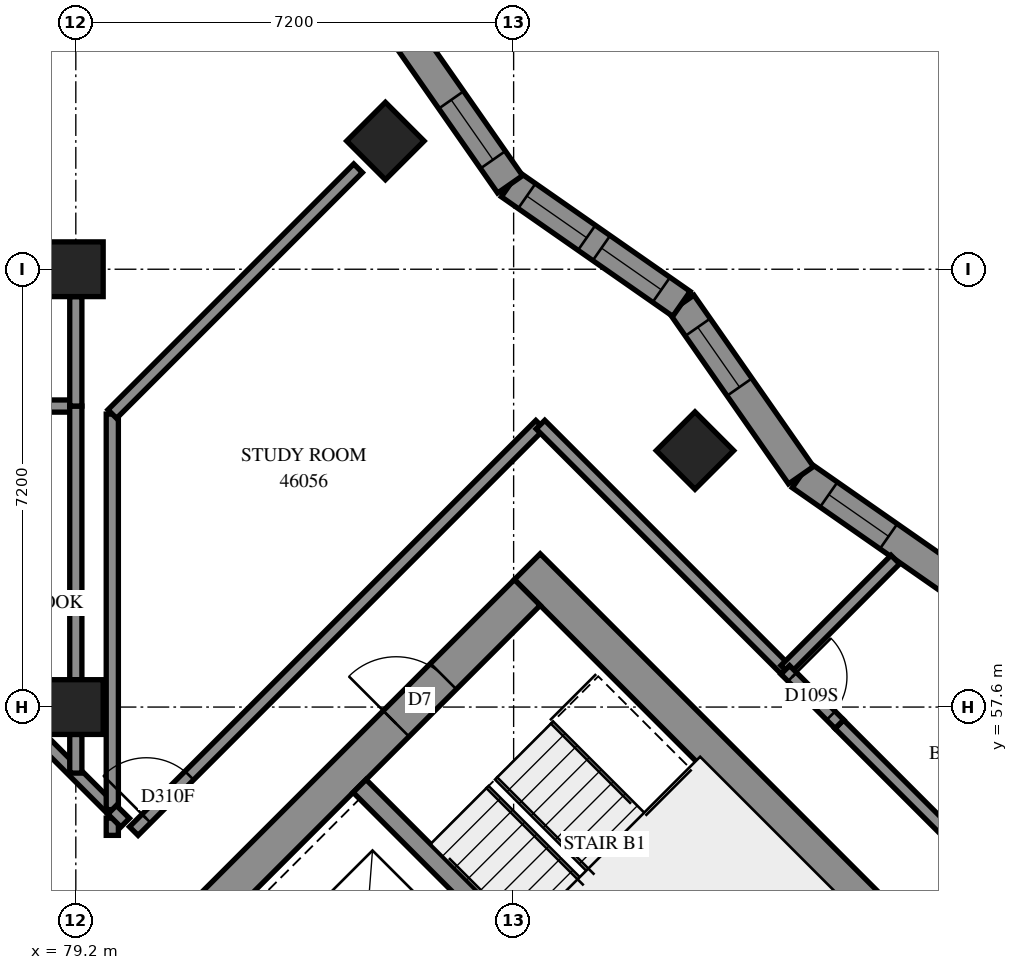
"""IFC4 building model, lengths in metres.
Left out: names, types, materials, properties, quantities, classifications, styles, units other than length and angle.
Written with IfcOpenShell. Run it as: python <this file> out.ifc"""

import sys

from ifc_helpers import new_model, si_unit, direction, frame, frame_2d, origin, origin_2d, place, context, subcontext, project, spatial, polyline, rectangle, outline, extrude, element, fill, save


model = new_model("IFC4")
c1 = context("Model", 3, precision=1e-05, world=origin(), true_north=direction((0.0, 1.0)))
c2 = subcontext(c1, "Body", "Model", "MODEL_VIEW")
j1 = project(units=[si_unit("LENGTHUNIT", "METRE"), si_unit("PLANEANGLEUNIT", "RADIAN")], contexts=[c1])
p1 = place(None, origin())
s1 = spatial("IfcSite", under=j1, at=p1, CompositionType="ELEMENT")
p2 = place(p1, origin())
s2 = spatial("IfcBuilding", under=s1, at=p2, CompositionType="ELEMENT")
p3 = place(p2, frame((0.0, 0.0, 169.4)))
s3 = spatial("IfcBuildingStorey", under=s2, at=p3, CompositionType="ELEMENT", Elevation=169.4)
for number, where, z_axis, x_axis in (
    (1, (79.2, 57.6, 0.0), (0.0, 0.0, 1.0), (1.0, 0.0, 0.0)),
    (2, (79.2, 64.8, 0.0), (0.0, 0.0, 1.0), (1.0, 0.0, 0.0)),
    (3, (84.291, 66.909, 0.0), (0.0, 0.0, 1.0), (0.707, -0.707, 0.0)),
    (4, (89.382, 61.818, 0.0), (0.0, 0.0, 1.0), (0.707, -0.707, 0.0)),
):
    element("IfcColumn", number, at=place(p3, frame(where, z_axis=z_axis, x_axis=x_axis)), inside=s3, PredefinedType="COLUMN", context=c2, shape_type="SweptSolid", body=[
        extrude(rectangle(XDim=0.9, YDim=0.9, at=origin_2d()), origin(), (0.0, 0.0, 1.0), 3.1),
    ])
p4 = place(p3, frame((86.625, 59.908, -0.3), z_axis=(0.0, 0.0, 1.0), x_axis=(0.7071067812, -0.7071067812, 0.0)))
e5 = element("IfcWall", 5, at=p4, inside=s3, PredefinedType="SHEAR", context=c2, shape_type="SweptSolid", body=[
    extrude(rectangle(XDim=15.6, YDim=0.6, at=frame_2d((7.8, 0.0))), origin(), (0.0, 0.0, 1.0), 2.7),
])
p5 = place(p4, frame((10.6, 0.0, 0.3)))
e6 = element("IfcOpeningElement", 6, at=p5, cuts=e5, PredefinedType="OPENING", context=c2, shape_type="SweptSolid", body=[
    extrude(rectangle(XDim=0.8, YDim=2.1, at=frame_2d((0.4, 1.05))), frame((0.0, 0.31, 0.0), z_axis=(0.0, -1.0, 0.0), x_axis=(1.0, 0.0, 0.0)), (0.0, 0.0, 1.0), 0.62),
])
p6 = place(p3, frame((76.442, 49.302, -0.3), z_axis=(0.0, 0.0, 1.0), x_axis=(0.7071067812, 0.7071067812, 0.0)))
e7 = element("IfcWall", 7, at=p6, inside=s3, PredefinedType="SHEAR", context=c2, shape_type="SweptSolid", body=[
    extrude(rectangle(XDim=14.4, YDim=0.6, at=frame_2d((7.2, 0.0))), origin(), (0.0, 0.0, 1.0), 2.7),
])
p7 = place(p6, frame((4.55, 0.0, 0.3)))
e8 = element("IfcOpeningElement", 8, at=p7, cuts=e7, PredefinedType="OPENING", context=c2, shape_type="SweptSolid", body=[
    extrude(rectangle(XDim=1.1, YDim=2.1, at=frame_2d((0.55, 1.05))), frame((0.0, 0.31, 0.0), z_axis=(0.0, -1.0, 0.0), x_axis=(1.0, 0.0, 0.0)), (0.0, 0.0, 1.0), 0.62),
])
p8 = place(p6, frame((11.35, 0.0, 0.3)))
e9 = element("IfcOpeningElement", 9, at=p8, cuts=e7, PredefinedType="OPENING", context=c2, shape_type="SweptSolid", body=[
    extrude(rectangle(XDim=1.1, YDim=2.1, at=frame_2d((0.55, 1.05))), frame((0.0, 0.31, 0.0), z_axis=(0.0, -1.0, 0.0), x_axis=(1.0, 0.0, 0.0)), (0.0, 0.0, 1.0), 0.62),
])
p9 = place(p3, frame((83.867, 56.302, 0.0), z_axis=(0.0, 0.0, 1.0), x_axis=(0.7071137256, -0.7070998367, 0.0)))
e10 = element("IfcWall", 10, at=p9, inside=s3, PredefinedType="SOLIDWALL", context=c2, shape_type="SweptSolid", body=[
    extrude(rectangle(XDim=7.2, YDim=0.3, at=frame_2d((3.6, 0.0))), origin(), (0.0, 0.0, 1.0), 3.1),
])
p10 = place(p3, frame((93.944, 59.447, 0.0), z_axis=(0.0, 0.0, 1.0), x_axis=(-0.8202082464, 0.5720650597, 0.0)))
e11 = element("IfcWall", 11, at=p10, inside=s3, PredefinedType="SOLIDWALL", context=c2, shape_type="SweptSolid", body=[
    extrude(outline(polyline([(-0.045, -0.25), (3.392, -0.25), (3.481, 0.25), (0.045, 0.25), (-0.045, -0.25)])), origin(), (0.0, 0.0, 1.0), 3.1),
])
p11 = place(p10, frame((1.68, 0.0, 0.45)))
e12 = element("IfcOpeningElement", 12, at=p11, cuts=e11, PredefinedType="OPENING", context=c2, shape_type="SweptSolid", body=[
    extrude(rectangle(XDim=1.2, YDim=2.5, at=frame_2d((0.6, 1.25))), frame((0.0, 0.26, 0.0), z_axis=(0.0, -1.0, 0.0), x_axis=(1.0, 0.0, 0.0)), (0.0, 0.0, 1.0), 0.52),
])
p12 = place(p3, frame((91.126, 61.412, 0.0), z_axis=(0.0, 0.0, 1.0), x_axis=(-0.5720454818, 0.8202219009, 0.0)))
e13 = element("IfcWall", 13, at=p12, inside=s3, PredefinedType="SOLIDWALL", context=c2, shape_type="SweptSolid", body=[
    extrude(outline(polyline([(0.045, -0.25), (3.481, -0.25), (3.392, 0.25), (-0.045, 0.25), (0.045, -0.25)])), origin(), (0.0, 0.0, 1.0), 3.1),
])
p13 = place(p12, frame((1.768, 0.0, 0.45)))
e14 = element("IfcOpeningElement", 14, at=p13, cuts=e13, PredefinedType="OPENING", context=c2, shape_type="SweptSolid", body=[
    extrude(rectangle(XDim=1.2, YDim=2.5, at=frame_2d((0.6, 1.25))), frame((0.0, 0.26, 0.0), z_axis=(0.0, -1.0, 0.0), x_axis=(1.0, 0.0, 0.0)), (0.0, 0.0, 1.0), 0.52),
])
p14 = place(p3, frame((89.16, 64.231, 0.0), z_axis=(0.0, 0.0, 1.0), x_axis=(-0.8202219009, 0.5720454818, 0.0)))
e15 = element("IfcWall", 15, at=p14, inside=s3, PredefinedType="SOLIDWALL", context=c2, shape_type="SweptSolid", body=[
    extrude(outline(polyline([(-0.045, -0.25), (3.392, -0.25), (3.481, 0.25), (0.045, 0.25), (-0.045, -0.25)])), origin(), (0.0, 0.0, 1.0), 3.1),
])
p15 = place(p14, frame((0.404, 0.0, 0.45)))
e16 = element("IfcOpeningElement", 16, at=p15, cuts=e15, PredefinedType="OPENING", context=c2, shape_type="SweptSolid", body=[
    extrude(rectangle(XDim=1.2, YDim=2.5, at=frame_2d((0.6, 1.25))), frame((0.0, 0.26, 0.0), z_axis=(0.0, -1.0, 0.0), x_axis=(1.0, 0.0, 0.0)), (0.0, 0.0, 1.0), 0.52),
])
p16 = place(p14, frame((1.9, 0.0, 0.45)))
e17 = element("IfcOpeningElement", 17, at=p16, cuts=e15, PredefinedType="OPENING", context=c2, shape_type="SweptSolid", body=[
    extrude(rectangle(XDim=1.2, YDim=2.5, at=frame_2d((0.6, 1.25))), frame((0.0, 0.26, 0.0), z_axis=(0.0, -1.0, 0.0), x_axis=(1.0, 0.0, 0.0)), (0.0, 0.0, 1.0), 0.52),
])
p17 = place(p3, frame((86.341, 66.197, 0.0), z_axis=(0.0, 0.0, 1.0), x_axis=(-0.5720454818, 0.8202219009, 0.0)))
e18 = element("IfcWall", 18, at=p17, inside=s3, PredefinedType="SOLIDWALL", context=c2, shape_type="SweptSolid", body=[
    extrude(outline(polyline([(0.045, -0.25), (3.481, -0.25), (3.392, 0.25), (-0.045, 0.25), (0.045, -0.25)])), origin(), (0.0, 0.0, 1.0), 3.1),
])
p18 = place(p17, frame((0.492, 0.0, 0.45)))
e19 = element("IfcOpeningElement", 19, at=p18, cuts=e18, PredefinedType="OPENING", context=c2, shape_type="SweptSolid", body=[
    extrude(rectangle(XDim=1.2, YDim=2.5, at=frame_2d((0.6, 1.25))), frame((0.0, 0.26, 0.0), z_axis=(0.0, -1.0, 0.0), x_axis=(1.0, 0.0, 0.0)), (0.0, 0.0, 1.0), 0.52),
])
p19 = place(p3, frame((91.755, 57.317, 0.0), z_axis=(0.0, 0.0, 1.0), x_axis=(0.7071067812, -0.7071067812, 0.0)))
e20 = element("IfcWall", 20, at=p19, inside=s3, PredefinedType="PARTITIONING", context=c2, shape_type="SweptSolid", body=[
    extrude(rectangle(XDim=11.639, YDim=0.2, at=frame_2d((5.819, 0.0))), origin(), (0.0, 0.0, 1.0), 3.1),
])
p20 = place(p3, frame((80.154, 55.56, 0.0), z_axis=(0.0, 0.0, 1.0), x_axis=(0.7071067812, 0.7071067812, 0.0)))
e21 = element("IfcWall", 21, at=p20, inside=s3, PredefinedType="PARTITIONING", context=c2, shape_type="SweptSolid", body=[
    extrude(rectangle(XDim=9.45, YDim=0.2, at=frame_2d((4.725, 0.0))), origin(), (0.0, 0.0, 1.0), 3.1),
])
p21 = place(p20, frame((0.292, 0.0, 0.0)))
e22 = element("IfcOpeningElement", 22, at=p21, cuts=e21, PredefinedType="OPENING", context=c2, shape_type="SweptSolid", body=[
    extrude(rectangle(XDim=1.0, YDim=2.1, at=frame_2d((0.5, 1.05))), frame((0.0, 0.11, 0.0), z_axis=(0.0, -1.0, 0.0), x_axis=(1.0, 0.0, 0.0)), (0.0, 0.0, 1.0), 0.22),
])
p22 = place(p3, frame((74.097, 61.611, 0.0), z_axis=(0.0, 0.0, 1.0), x_axis=(0.7071067812, -0.7071067812, 0.0)))
e23 = element("IfcWall", 23, at=p22, inside=s3, PredefinedType="PARTITIONING", context=c2, shape_type="SweptSolid", body=[
    extrude(rectangle(XDim=8.061, YDim=0.2, at=frame_2d((4.03, 0.0))), origin(), (0.0, 0.0, 1.0), 3.1),
])
p23 = place(p3, frame((79.8, 55.914, 0.0), z_axis=(0.0, 0.0, 1.0), x_axis=(0.0, 1.0, 0.0)))
e24 = element("IfcWall", 24, at=p23, inside=s3, PredefinedType="PARTITIONING", context=c2, shape_type="SweptSolid", body=[
    extrude(rectangle(XDim=6.504, YDim=0.2, at=frame_2d((3.252, 0.0))), origin(), (0.0, 0.0, 1.0), 3.1),
])
p24 = place(p3, frame((79.799, 62.419, 0.0), z_axis=(0.0, 0.0, 1.0), x_axis=(0.7071067812, 0.7071067812, 0.0)))
e25 = element("IfcWall", 25, at=p24, inside=s3, PredefinedType="PARTITIONING", context=c2, shape_type="SweptSolid", body=[
    extrude(rectangle(XDim=5.716, YDim=0.2, at=frame_2d((2.858, 0.0))), origin(), (0.0, 0.0, 1.0), 3.1),
])
p25 = place(p3, frame((86.841, 62.245, 0.0), z_axis=(0.0, 0.0, 1.0), x_axis=(0.7071067812, -0.7071067812, 0.0)))
e26 = element("IfcWall", 26, at=p25, inside=s3, PredefinedType="PARTITIONING", context=c2, shape_type="SweptSolid", body=[
    extrude(rectangle(XDim=5.699, YDim=0.2, at=frame_2d((2.85, 0.0))), origin(), (0.0, 0.0, 1.0), 3.1),
])
p26 = place(p3, frame((74.102, 62.55, 0.0), z_axis=(0.0, 0.0, 1.0), x_axis=(1.0, 0.0, 0.0)))
e27 = element("IfcWall", 27, at=p26, inside=s3, PredefinedType="PARTITIONING", context=c2, shape_type="SweptSolid", body=[
    extrude(rectangle(XDim=5.098, YDim=0.2, at=frame_2d((2.549, 0.0))), origin(), (0.0, 0.0, 1.0), 3.1),
])
p27 = place(p26, frame((1.319, 0.0, 0.0)))
e28 = element("IfcOpeningElement", 28, at=p27, cuts=e27, PredefinedType="OPENING", context=c2, shape_type="SweptSolid", body=[
    extrude(rectangle(XDim=1.0, YDim=2.1, at=frame_2d((0.5, 1.05))), frame((0.0, 0.11, 0.0), z_axis=(0.0, -1.0, 0.0), x_axis=(1.0, 0.0, 0.0)), (0.0, 0.0, 1.0), 0.22),
])
p28 = place(p3, frame((79.2, 58.05, 0.0), z_axis=(0.0, 0.0, 1.0), x_axis=(0.0, 1.0, 0.0)))
e29 = element("IfcWall", 29, at=p28, inside=s3, PredefinedType="PARTITIONING", context=c2, shape_type="SweptSolid", body=[
    extrude(rectangle(XDim=4.5, YDim=0.2, at=frame_2d((2.25, 0.0))), origin(), (0.0, 0.0, 1.0), 3.1),
])
p29 = place(p3, frame((90.867, 58.213, 0.0), z_axis=(0.0, 0.0, 1.0), x_axis=(0.7066186165, 0.7075946091, 0.0)))
e30 = element("IfcWall", 30, at=p29, inside=s3, PredefinedType="PARTITIONING", context=c2, shape_type="SweptSolid", body=[
    extrude(rectangle(XDim=2.562, YDim=0.2, at=frame_2d((1.281, 0.0))), origin(), (0.0, 0.0, 1.0), 3.1),
])
p30 = place(p3, frame((79.2, 62.55, 0.0), z_axis=(0.0, 0.0, 1.0), x_axis=(0.0, 1.0, 0.0)))
e31 = element("IfcWall", 31, at=p30, inside=s3, PredefinedType="PARTITIONING", context=c2, shape_type="SweptSolid", body=[
    extrude(rectangle(XDim=1.8, YDim=0.2, at=frame_2d((0.9, 0.0))), origin(), (0.0, 0.0, 1.0), 3.1),
])
p31 = place(p3, frame((90.867, 58.211, 0.0), z_axis=(0.0, 0.0, 1.0), x_axis=(0.706312726, -0.7078999456, 0.0)))
e32 = element("IfcWall", 32, at=p31, inside=s3, PredefinedType="PARTITIONING", context=c2, shape_type="SweptSolid", body=[
    extrude(rectangle(XDim=1.26, YDim=0.2, at=frame_2d((0.63, 0.0))), origin(), (0.0, 0.0, 1.0), 3.1),
])
p32 = place(p31, frame((0.162, 0.0, 0.0)))
e33 = element("IfcOpeningElement", 33, at=p32, cuts=e32, PredefinedType="OPENING", context=c2, shape_type="SweptSolid", body=[
    extrude(rectangle(XDim=0.9, YDim=2.1, at=frame_2d((0.45, 1.05))), frame((0.0, 0.11, 0.0), z_axis=(0.0, -1.0, 0.0), x_axis=(1.0, 0.0, 0.0)), (0.0, 0.0, 1.0), 0.22),
])
p33 = place(p3, frame((79.2, 56.514, 0.0), z_axis=(0.0, 0.0, 1.0), x_axis=(0.0, 1.0, 0.0)))
e34 = element("IfcWall", 34, at=p33, inside=s3, PredefinedType="PARTITIONING", context=c2, shape_type="SweptSolid", body=[
    extrude(rectangle(XDim=0.636, YDim=0.2, at=frame_2d((0.318, 0.0))), origin(), (0.0, 0.0, 1.0), 3.1),
])
p34 = place(p3, frame((79.8, 55.49, 0.0), z_axis=(0.0, 0.0, 1.0), x_axis=(0.0, 1.0, 0.0)))
e35 = element("IfcWall", 35, at=p34, inside=s3, PredefinedType="PARTITIONING", context=c2, shape_type="SweptSolid", body=[
    extrude(rectangle(XDim=0.284, YDim=0.2, at=frame_2d((0.142, 0.0))), origin(), (0.0, 0.0, 1.0), 3.1),
])
p35 = place(p3, frame((79.797, 55.911, 0.0), z_axis=(0.0, 0.0, 1.0), x_axis=(0.710418702, -0.7037792749, 0.0)))
e36 = element("IfcWall", 36, at=p35, inside=s3, PredefinedType="PARTITIONING", context=c2, shape_type="SweptSolid", body=[
    extrude(rectangle(XDim=0.301, YDim=0.2, at=frame_2d((0.151, 0.0))), origin(), (0.0, 0.0, 1.0), 3.1),
])
p36 = place(p11, origin())
e37 = element("IfcWindow", 37, at=p36, inside=s3, PartitioningType="SINGLE_PANEL", PredefinedType="WINDOW", context=c2, shape_type="SweptSolid", body=[
    extrude(rectangle(XDim=1.2, YDim=2.5, at=frame_2d((0.6, 1.25))), frame((0.0, 0.18, 0.0), z_axis=(0.0, -1.0, 0.0), x_axis=(1.0, 0.0, 0.0)), (0.0, 0.0, 1.0), 0.06),
])
fill(e12, e37)
p37 = place(p13, origin())
e38 = element("IfcWindow", 38, at=p37, inside=s3, PartitioningType="SINGLE_PANEL", PredefinedType="WINDOW", context=c2, shape_type="SweptSolid", body=[
    extrude(rectangle(XDim=1.2, YDim=2.5, at=frame_2d((0.6, 1.25))), frame((0.0, 0.18, 0.0), z_axis=(0.0, -1.0, 0.0), x_axis=(1.0, 0.0, 0.0)), (0.0, 0.0, 1.0), 0.06),
])
fill(e14, e38)
p38 = place(p15, origin())
e39 = element("IfcWindow", 39, at=p38, inside=s3, PartitioningType="SINGLE_PANEL", PredefinedType="WINDOW", context=c2, shape_type="SweptSolid", body=[
    extrude(rectangle(XDim=1.2, YDim=2.5, at=frame_2d((0.6, 1.25))), frame((0.0, 0.18, 0.0), z_axis=(0.0, -1.0, 0.0), x_axis=(1.0, 0.0, 0.0)), (0.0, 0.0, 1.0), 0.06),
])
fill(e16, e39)
p39 = place(p16, origin())
e40 = element("IfcWindow", 40, at=p39, inside=s3, PartitioningType="SINGLE_PANEL", PredefinedType="WINDOW", context=c2, shape_type="SweptSolid", body=[
    extrude(rectangle(XDim=1.2, YDim=2.5, at=frame_2d((0.6, 1.25))), frame((0.0, 0.18, 0.0), z_axis=(0.0, -1.0, 0.0), x_axis=(1.0, 0.0, 0.0)), (0.0, 0.0, 1.0), 0.06),
])
fill(e17, e40)
p40 = place(p18, origin())
e41 = element("IfcWindow", 41, at=p40, inside=s3, PartitioningType="SINGLE_PANEL", PredefinedType="WINDOW", context=c2, shape_type="SweptSolid", body=[
    extrude(rectangle(XDim=1.2, YDim=2.5, at=frame_2d((0.6, 1.25))), frame((0.0, 0.18, 0.0), z_axis=(0.0, -1.0, 0.0), x_axis=(1.0, 0.0, 0.0)), (0.0, 0.0, 1.0), 0.06),
])
fill(e19, e41)
p41 = place(p8, origin())
e42 = element("IfcDoor", 42, at=p41, inside=s3, OperationType="SINGLE_SWING_LEFT", PredefinedType="DOOR", context=c2, shape_type="SweptSolid", body=[
    extrude(rectangle(XDim=1.1, YDim=2.1, at=frame_2d((0.55, 1.05))), frame((0.0, 0.025, 0.0), z_axis=(0.0, -1.0, 0.0), x_axis=(1.0, 0.0, 0.0)), (0.0, 0.0, 1.0), 0.05),
])
fill(e9, e42)
p42 = place(p21, origin())
e43 = element("IfcDoor", 43, at=p42, inside=s3, OperationType="SINGLE_SWING_LEFT", PredefinedType="DOOR", context=c2, shape_type="SweptSolid", body=[
    extrude(rectangle(XDim=1.0, YDim=2.1, at=frame_2d((0.5, 1.05))), frame((0.0, 0.025, 0.0), z_axis=(0.0, -1.0, 0.0), x_axis=(1.0, 0.0, 0.0)), (0.0, 0.0, 1.0), 0.05),
])
fill(e22, e43)
p43 = place(p32, origin())
e44 = element("IfcDoor", 44, at=p43, inside=s3, OperationType="SINGLE_SWING_RIGHT", PredefinedType="DOOR", context=c2, shape_type="SweptSolid", body=[
    extrude(rectangle(XDim=0.9, YDim=2.1, at=frame_2d((0.45, 1.05))), frame((0.0, 0.025, 0.0), z_axis=(0.0, -1.0, 0.0), x_axis=(1.0, 0.0, 0.0)), (0.0, 0.0, 1.0), 0.05),
])
fill(e33, e44)
save(model, sys.argv[1])
